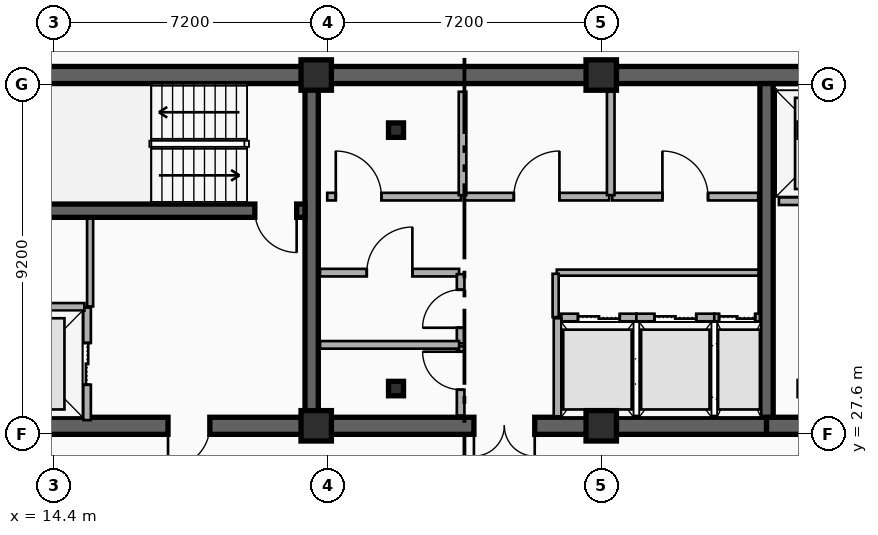
"""IFC4 building model, lengths in metres.
Left out: names, types, materials, properties, quantities, classifications, styles, units other than length and angle.
Written with IfcOpenShell. Run it as: python <this file> out.ifc"""

import sys

from ifc_helpers import new_model, si_unit, direction, frame, frame_2d, origin, origin_2d, place, context, subcontext, project, spatial, rectangle, i_section, extrude, element, fill, save


model = new_model("IFC4")
c1 = context("Model", 3, precision=1e-05, world=origin(), true_north=direction((0.0, 1.0)))
c2 = subcontext(c1, "Body", "Model", "MODEL_VIEW")
j1 = project(units=[si_unit("LENGTHUNIT", "METRE"), si_unit("PLANEANGLEUNIT", "RADIAN")], contexts=[c1])
p1 = place(None, origin())
s1 = spatial("IfcSite", under=j1, at=p1, CompositionType="ELEMENT")
p2 = place(p1, origin())
s2 = spatial("IfcBuilding", under=s1, at=p2, CompositionType="ELEMENT")
p3 = place(p2, frame((0.0, 0.0, 254.7)))
s3 = spatial("IfcBuildingStorey", under=s2, at=p3, CompositionType="ELEMENT", Elevation=254.7)
p4 = place(p3, frame((12.15, 37.05, 0.0), z_axis=(0.0, 0.0, 1.0), x_axis=(1.0, 0.0, 0.0)))
e1 = element("IfcWall", 1, at=p4, inside=s3, PredefinedType="SHEAR", context=c2, shape_type="SweptSolid", body=[
    extrude(rectangle(XDim=33.23, YDim=0.45, at=frame_2d((16.615, 0.0))), origin(), (0.0, 0.0, 1.0), 3.7),
])
p5 = place(p3, frame((21.18, 27.82, 0.0), z_axis=(0.0, 0.0, 1.0), x_axis=(-1.0, 0.0, 0.0)))
e2 = element("IfcWall", 2, at=p5, inside=s3, PredefinedType="SHEAR", context=c2, shape_type="SweptSolid", body=[
    extrude(rectangle(XDim=9.03, YDim=0.45, at=frame_2d((4.515, 0.0))), origin(), (0.0, 0.0, 1.0), 3.7),
])
p6 = place(p5, frame((2.68, 0.0, 0.0)))
e3 = element("IfcOpeningElement", 3, at=p6, cuts=e2, PredefinedType="OPENING", context=c2, shape_type="SweptSolid", body=[
    extrude(rectangle(XDim=1.1, YDim=2.15, at=frame_2d((0.55, 1.075))), frame((0.0, 0.235, 0.0), z_axis=(0.0, -1.0, 0.0), x_axis=(1.0, 0.0, 0.0)), (0.0, 0.0, 1.0), 0.47),
])
p7 = place(p3, frame((33.15, 27.82, 0.0), z_axis=(0.0, 0.0, 1.0), x_axis=(-1.0, 0.0, 0.0)))
e4 = element("IfcWall", 4, at=p7, inside=s3, PredefinedType="SHEAR", context=c2, shape_type="SweptSolid", body=[
    extrude(rectangle(XDim=11.97, YDim=0.45, at=frame_2d((5.985, 0.0))), origin(), (0.0, 0.0, 1.0), 3.7),
])
p8 = place(p7, frame((6.1, 0.0, 0.0)))
e5 = element("IfcOpeningElement", 5, at=p8, cuts=e4, PredefinedType="OPENING", context=c2, shape_type="SweptSolid", body=[
    extrude(rectangle(XDim=1.6, YDim=2.2, at=frame_2d((0.8, 1.1))), frame((0.0, 0.235, 0.0), z_axis=(0.0, -1.0, 0.0), x_axis=(1.0, 0.0, 0.0)), (0.0, 0.0, 1.0), 0.47),
])
p9 = place(p3, frame((45.38, 27.82, 0.0), z_axis=(0.0, 0.0, 1.0), x_axis=(-1.0, 0.0, 0.0)))
e6 = element("IfcWall", 6, at=p9, inside=s3, PredefinedType="SHEAR", context=c2, shape_type="SweptSolid", body=[
    extrude(rectangle(XDim=12.23, YDim=0.45, at=frame_2d((6.115, 0.0))), origin(), (0.0, 0.0, 1.0), 3.7),
])
p10 = place(p9, frame((9.93, 0.0, 0.0)))
e7 = element("IfcOpeningElement", 7, at=p10, cuts=e6, PredefinedType="OPENING", context=c2, shape_type="SweptSolid", body=[
    extrude(rectangle(XDim=1.1, YDim=2.15, at=frame_2d((0.55, 1.075))), frame((0.0, 0.235, 0.0), z_axis=(0.0, -1.0, 0.0), x_axis=(1.0, 0.0, 0.0)), (0.0, 0.0, 1.0), 0.47),
])
p11 = place(p9, frame((6.23, 0.0, 0.0)))
e8 = element("IfcOpeningElement", 8, at=p11, cuts=e6, PredefinedType="OPENING", context=c2, shape_type="SweptSolid", body=[
    extrude(rectangle(XDim=1.1, YDim=2.15, at=frame_2d((0.55, 1.075))), frame((0.0, 0.235, 0.0), z_axis=(0.0, -1.0, 0.0), x_axis=(1.0, 0.0, 0.0)), (0.0, 0.0, 1.0), 0.47),
])
for number, where, z_axis, x_axis in (
    (9, (21.18, 28.045, 0.0), (0.0, 0.0, 1.0), (0.0, 1.0, 0.0)),
    (10, (33.15, 28.045, 0.0), (0.0, 0.0, 1.0), (0.0, 1.0, 0.0)),
):
    element("IfcWall", number, at=place(p3, frame(where, z_axis=z_axis, x_axis=x_axis)), inside=s3, PredefinedType="SHEAR", context=c2, shape_type="SweptSolid", body=[
        extrude(rectangle(XDim=8.78, YDim=0.35, at=frame_2d((4.39, 0.0))), origin(), (0.0, 0.0, 1.0), 3.7),
    ])
p12 = place(p3, frame((21.005, 33.48, 0.0), z_axis=(0.0, 0.0, 1.0), x_axis=(-1.0, 0.0, 0.0)))
e11 = element("IfcWall", 11, at=p12, inside=s3, PredefinedType="SHEAR", context=c2, shape_type="SweptSolid", body=[
    extrude(rectangle(XDim=8.63, YDim=0.35, at=frame_2d((4.315, 0.0))), origin(), (0.0, 0.0, 1.0), 3.7),
])
p13 = place(p12, frame((0.22, 0.0, 0.0)))
e12 = element("IfcOpeningElement", 12, at=p13, cuts=e11, PredefinedType="OPENING", context=c2, shape_type="SweptSolid", body=[
    extrude(rectangle(XDim=1.1, YDim=2.15, at=frame_2d((0.55, 1.075))), frame((0.0, 0.185, 0.0), z_axis=(0.0, -1.0, 0.0), x_axis=(1.0, 0.0, 0.0)), (0.0, 0.0, 1.0), 0.37),
])
for number, where, z_axis, x_axis in (
    (13, (23.4, 28.8, 0.0), (0.0, 0.0, 1.0), (1.0, 0.0, 0.0)),
    (14, (23.4, 35.6, 0.0), (0.0, 0.0, 1.0), (1.0, 0.0, 0.0)),
):
    element("IfcColumn", number, at=place(p3, frame(where, z_axis=z_axis, x_axis=x_axis)), inside=s3, PredefinedType="COLUMN", context=c2, shape_type="SweptSolid", body=[
        extrude(i_section(OverallWidth=0.395, OverallDepth=0.38, WebThickness=0.019, FlangeThickness=0.03, FilletRadius=0.015, at=origin_2d()), origin(), (0.0, 0.0, 1.0), 3.7),
    ])
for number, where, z_axis, x_axis in (
    (15, (21.3, 27.82, 0.0), (0.0, 0.0, 1.0), (1.0, 0.0, 0.0)),
    (16, (21.3, 37.05, 0.0), (0.0, 0.0, 1.0), (1.0, 0.0, 0.0)),
    (17, (28.8, 27.82, 0.0), (0.0, 0.0, 1.0), (1.0, 0.0, 0.0)),
    (18, (28.8, 37.05, 0.0), (0.0, 0.0, 1.0), (1.0, 0.0, 0.0)),
):
    element("IfcColumn", number, at=place(p3, frame(where, z_axis=z_axis, x_axis=x_axis)), inside=s3, PredefinedType="COLUMN", context=c2, shape_type="SweptSolid", body=[
        extrude(rectangle(XDim=0.8, YDim=0.8, at=origin_2d()), origin(), (0.0, 0.0, 1.0), 3.7),
    ])
p14 = place(p3, frame((15.27, 27.97, 0.0), z_axis=(0.0, 0.0, 1.0), x_axis=(0.0, 1.0, 0.0)))
e19 = element("IfcWall", 19, at=p14, inside=s3, PredefinedType="PARTITIONING", context=c2, shape_type="SweptSolid", body=[
    extrude(rectangle(XDim=2.96, YDim=0.2, at=frame_2d((1.48, 0.0))), origin(), (0.0, 0.0, 1.0), 2.49),
])
p15 = place(p14, frame((0.93, 0.0, 0.0)))
e20 = element("IfcOpeningElement", 20, at=p15, cuts=e19, PredefinedType="OPENING", context=c2, shape_type="SweptSolid", body=[
    extrude(rectangle(XDim=1.1, YDim=2.15, at=frame_2d((0.55, 1.075))), frame((0.0, 0.11, 0.0), z_axis=(0.0, -1.0, 0.0), x_axis=(1.0, 0.0, 0.0)), (0.0, 0.0, 1.0), 0.22),
])
p16 = place(p3, frame((12.45, 30.95, 0.0), z_axis=(0.0, 0.0, 1.0), x_axis=(1.0, 0.0, 0.0)))
e21 = element("IfcWall", 21, at=p16, inside=s3, PredefinedType="PARTITIONING", context=c2, shape_type="SweptSolid", body=[
    extrude(rectangle(XDim=2.75, YDim=0.2, at=frame_2d((1.375, 0.0))), origin(), (0.0, 0.0, 1.0), 2.49),
])
p17 = place(p3, frame((33.475, 33.73, 0.0), z_axis=(0.0, 0.0, 1.0), x_axis=(1.0, 0.0, 0.0)))
e22 = element("IfcWall", 22, at=p17, inside=s3, PredefinedType="PARTITIONING", context=c2, shape_type="SweptSolid", body=[
    extrude(rectangle(XDim=2.725, YDim=0.2, at=frame_2d((1.362, 0.0))), origin(), (0.0, 0.0, 1.0), 2.49),
])
p18 = place(p17, frame((0.812, 0.0, 0.0)))
e23 = element("IfcOpeningElement", 23, at=p18, cuts=e22, PredefinedType="OPENING", context=c2, shape_type="SweptSolid", body=[
    extrude(rectangle(XDim=1.1, YDim=2.15, at=frame_2d((0.55, 1.075))), frame((0.0, 0.11, 0.0), z_axis=(0.0, -1.0, 0.0), x_axis=(1.0, 0.0, 0.0)), (0.0, 0.0, 1.0), 0.22),
])
p19 = place(p3, frame((27.75, 30.67, 0.0), z_axis=(0.0, 0.0, 1.0), x_axis=(1.0, 0.0, 0.0)))
e24 = element("IfcWall", 24, at=p19, inside=s3, PredefinedType="PARTITIONING", context=c2, shape_type="SweptSolid", body=[
    extrude(rectangle(XDim=1.975, YDim=0.2, at=frame_2d((0.988, 0.0))), origin(), (0.0, 0.0, 1.0), 2.49),
])
p20 = place(p19, frame((0.438, 0.0, 0.0)))
e25 = element("IfcOpeningElement", 25, at=p20, cuts=e24, PredefinedType="OPENING", context=c2, shape_type="SweptSolid", body=[
    extrude(rectangle(XDim=1.1, YDim=2.15, at=frame_2d((0.55, 1.075))), frame((0.0, 0.11, 0.0), z_axis=(0.0, -1.0, 0.0), x_axis=(1.0, 0.0, 0.0)), (0.0, 0.0, 1.0), 0.22),
])
p21 = place(p3, frame((27.65, 28.07, 0.0), z_axis=(0.0, 0.0, 1.0), x_axis=(0.0, 1.0, 0.0)))
e26 = element("IfcWall", 26, at=p21, inside=s3, PredefinedType="PARTITIONING", context=c2, shape_type="SweptSolid", body=[
    extrude(rectangle(XDim=2.58, YDim=0.2, at=frame_2d((1.29, 0.0))), origin(), (0.0, 0.0, 1.0), 2.49),
])
p22 = place(p3, frame((29.725, 30.67, 0.0), z_axis=(0.0, 0.0, 1.0), x_axis=(1.0, 0.0, 0.0)))
e27 = element("IfcWall", 27, at=p22, inside=s3, PredefinedType="PARTITIONING", context=c2, shape_type="SweptSolid", body=[
    extrude(rectangle(XDim=2.05, YDim=0.2, at=frame_2d((1.025, 0.0))), origin(), (0.0, 0.0, 1.0), 2.8),
])
p23 = place(p22, frame((0.475, 0.0, 0.0)))
e28 = element("IfcOpeningElement", 28, at=p23, cuts=e27, PredefinedType="OPENING", context=c2, shape_type="SweptSolid", body=[
    extrude(rectangle(XDim=1.1, YDim=2.15, at=frame_2d((0.55, 1.075))), frame((0.0, 0.11, 0.0), z_axis=(0.0, -1.0, 0.0), x_axis=(1.0, 0.0, 0.0)), (0.0, 0.0, 1.0), 0.22),
])
p24 = place(p3, frame((31.775, 30.67, 0.0), z_axis=(0.0, 0.0, 1.0), x_axis=(1.0, 0.0, 0.0)))
e29 = element("IfcWall", 29, at=p24, inside=s3, PredefinedType="PARTITIONING", context=c2, shape_type="SweptSolid", body=[
    extrude(rectangle(XDim=1.2, YDim=0.2, at=frame_2d((0.6, 0.0))), origin(), (0.0, 0.0, 1.0), 2.8),
])
p25 = place(p24, frame((0.125, 0.0, 0.0)))
e30 = element("IfcOpeningElement", 30, at=p25, cuts=e29, PredefinedType="OPENING", context=c2, shape_type="SweptSolid", body=[
    extrude(rectangle(XDim=0.95, YDim=2.15, at=frame_2d((0.475, 1.075))), frame((0.0, 0.11, 0.0), z_axis=(0.0, -1.0, 0.0), x_axis=(1.0, 0.0, 0.0)), (0.0, 0.0, 1.0), 0.22),
])
p26 = place(p3, frame((21.4, 31.85, 0.0), z_axis=(0.0, 0.0, 1.0), x_axis=(1.0, 0.0, 0.0)))
e31 = element("IfcWall", 31, at=p26, inside=s3, PredefinedType="PARTITIONING", context=c2, shape_type="SweptSolid", body=[
    extrude(rectangle(XDim=3.66, YDim=0.2, at=frame_2d((1.83, 0.0))), origin(), (0.0, 0.0, 1.0), 2.49),
])
p27 = place(p26, frame((1.23, 0.0, 0.0)))
e32 = element("IfcOpeningElement", 32, at=p27, cuts=e31, PredefinedType="OPENING", context=c2, shape_type="SweptSolid", body=[
    extrude(rectangle(XDim=1.2, YDim=2.15, at=frame_2d((0.6, 1.075))), frame((0.0, 0.11, 0.0), z_axis=(0.0, -1.0, 0.0), x_axis=(1.0, 0.0, 0.0)), (0.0, 0.0, 1.0), 0.22),
])
p28 = place(p3, frame((21.59, 33.85, 0.0), z_axis=(0.0, 0.0, 1.0), x_axis=(1.0, 0.0, 0.0)))
e33 = element("IfcWall", 33, at=p28, inside=s3, PredefinedType="PARTITIONING", context=c2, shape_type="SweptSolid", body=[
    extrude(rectangle(XDim=3.52, YDim=0.2, at=frame_2d((1.76, 0.0))), origin(), (0.0, 0.0, 1.0), 2.49),
])
p29 = place(p28, frame((0.225, 0.0, 0.0)))
e34 = element("IfcOpeningElement", 34, at=p29, cuts=e33, PredefinedType="OPENING", context=c2, shape_type="SweptSolid", body=[
    extrude(rectangle(XDim=1.2, YDim=2.15, at=frame_2d((0.6, 1.075))), frame((0.0, 0.11, 0.0), z_axis=(0.0, -1.0, 0.0), x_axis=(1.0, 0.0, 0.0)), (0.0, 0.0, 1.0), 0.22),
])
p30 = place(p3, frame((25.19, 33.85, 0.0), z_axis=(0.0, 0.0, 1.0), x_axis=(1.0, 0.0, 0.0)))
e35 = element("IfcWall", 35, at=p30, inside=s3, PredefinedType="PARTITIONING", context=c2, shape_type="SweptSolid", body=[
    extrude(rectangle(XDim=3.82, YDim=0.2, at=frame_2d((1.91, 0.0))), origin(), (0.0, 0.0, 1.0), 2.49),
])
p31 = place(p30, frame((1.31, 0.0, 0.0)))
e36 = element("IfcOpeningElement", 36, at=p31, cuts=e35, PredefinedType="OPENING", context=c2, shape_type="SweptSolid", body=[
    extrude(rectangle(XDim=1.2, YDim=2.15, at=frame_2d((0.6, 1.075))), frame((0.0, 0.11, 0.0), z_axis=(0.0, -1.0, 0.0), x_axis=(1.0, 0.0, 0.0)), (0.0, 0.0, 1.0), 0.22),
])
p32 = place(p3, frame((29.09, 33.85, 0.0), z_axis=(0.0, 0.0, 1.0), x_axis=(1.0, 0.0, 0.0)))
e37 = element("IfcWall", 37, at=p32, inside=s3, PredefinedType="PARTITIONING", context=c2, shape_type="SweptSolid", body=[
    extrude(rectangle(XDim=3.84, YDim=0.2, at=frame_2d((1.92, 0.0))), origin(), (0.0, 0.0, 1.0), 2.49),
])
p33 = place(p32, frame((1.32, 0.0, 0.0)))
e38 = element("IfcOpeningElement", 38, at=p33, cuts=e37, PredefinedType="OPENING", context=c2, shape_type="SweptSolid", body=[
    extrude(rectangle(XDim=1.2, YDim=2.15, at=frame_2d((0.6, 1.075))), frame((0.0, 0.11, 0.0), z_axis=(0.0, -1.0, 0.0), x_axis=(1.0, 0.0, 0.0)), (0.0, 0.0, 1.0), 0.22),
])
p34 = place(p3, frame((25.1, 28.09, 0.0), z_axis=(0.0, 0.0, 1.0), x_axis=(0.0, 1.0, 0.0)))
e39 = element("IfcWall", 39, at=p34, inside=s3, PredefinedType="PARTITIONING", context=c2, shape_type="SweptSolid", body=[
    extrude(rectangle(XDim=1.82, YDim=0.2, at=frame_2d((0.91, 0.0))), origin(), (0.0, 0.0, 1.0), 2.8),
])
p35 = place(p34, frame((0.68, 0.0, 0.0)))
e40 = element("IfcOpeningElement", 40, at=p35, cuts=e39, PredefinedType="OPENING", context=c2, shape_type="SweptSolid", body=[
    extrude(rectangle(XDim=1.0, YDim=2.15, at=frame_2d((0.5, 1.075))), frame((0.0, 0.11, 0.0), z_axis=(0.0, -1.0, 0.0), x_axis=(1.0, 0.0, 0.0)), (0.0, 0.0, 1.0), 0.22),
])
p36 = place(p3, frame((25.1, 29.99, 0.0), z_axis=(0.0, 0.0, 1.0), x_axis=(0.0, 1.0, 0.0)))
e41 = element("IfcWall", 41, at=p36, inside=s3, PredefinedType="PARTITIONING", context=c2, shape_type="SweptSolid", body=[
    extrude(rectangle(XDim=1.82, YDim=0.2, at=frame_2d((0.91, 0.0))), origin(), (0.0, 0.0, 1.0), 3.42),
])
p37 = place(p36, frame((0.41, 0.0, 0.0)))
e42 = element("IfcOpeningElement", 42, at=p37, cuts=e41, PredefinedType="OPENING", context=c2, shape_type="SweptSolid", body=[
    extrude(rectangle(XDim=1.0, YDim=2.15, at=frame_2d((0.5, 1.075))), frame((0.0, 0.11, 0.0), z_axis=(0.0, -1.0, 0.0), x_axis=(1.0, 0.0, 0.0)), (0.0, 0.0, 1.0), 0.22),
])
p38 = place(p3, frame((21.4, 29.95, 0.0), z_axis=(0.0, 0.0, 1.0), x_axis=(1.0, 0.0, 0.0)))
e43 = element("IfcWall", 43, at=p38, inside=s3, PredefinedType="PARTITIONING", context=c2, shape_type="SweptSolid", body=[
    extrude(rectangle(XDim=3.66, YDim=0.2, at=frame_2d((1.83, 0.0))), origin(), (0.0, 0.0, 1.0), 2.49),
])
p39 = place(p3, frame((25.15, 33.89, 0.0), z_axis=(0.0, 0.0, 1.0), x_axis=(0.0, 1.0, 0.0)))
e44 = element("IfcWall", 44, at=p39, inside=s3, PredefinedType="PARTITIONING", context=c2, shape_type="SweptSolid", body=[
    extrude(rectangle(XDim=2.72, YDim=0.2, at=frame_2d((1.36, 0.0))), origin(), (0.0, 0.0, 1.0), 3.42),
])
p40 = place(p3, frame((29.05, 33.89, 0.0), z_axis=(0.0, 0.0, 1.0), x_axis=(0.0, 1.0, 0.0)))
e45 = element("IfcWall", 45, at=p40, inside=s3, PredefinedType="PARTITIONING", context=c2, shape_type="SweptSolid", body=[
    extrude(rectangle(XDim=2.72, YDim=0.2, at=frame_2d((1.36, 0.0))), origin(), (0.0, 0.0, 1.0), 2.49),
])
p41 = place(p3, frame((15.35, 30.96, 0.0), z_axis=(0.0, 0.0, 1.0), x_axis=(0.0, 1.0, 0.0)))
e46 = element("IfcWall", 46, at=p41, inside=s3, PredefinedType="PARTITIONING", context=c2, shape_type="SweptSolid", body=[
    extrude(rectangle(XDim=2.31, YDim=0.16, at=frame_2d((1.155, 0.0))), origin(), (0.0, 0.0, 1.0), 3.42),
])
p42 = place(p3, frame((27.63, 31.85, 0.0), z_axis=(0.0, 0.0, 1.0), x_axis=(1.0, 0.0, 0.0)))
e47 = element("IfcWall", 47, at=p42, inside=s3, PredefinedType="PARTITIONING", context=c2, shape_type="SweptSolid", body=[
    extrude(rectangle(XDim=5.31, YDim=0.16, at=frame_2d((2.655, 0.0))), origin(), (0.0, 0.0, 1.0), 2.49),
])
p43 = place(p3, frame((27.6, 30.68, 0.0), z_axis=(0.0, 0.0, 1.0), x_axis=(0.0, 1.0, 0.0)))
e48 = element("IfcWall", 48, at=p43, inside=s3, PredefinedType="PARTITIONING", context=c2, shape_type="SweptSolid", body=[
    extrude(rectangle(XDim=1.14, YDim=0.16, at=frame_2d((0.57, 0.0))), origin(), (0.0, 0.0, 1.0), 3.42),
])
p44 = place(p15, origin())
e49 = element("IfcDoor", 49, at=p44, inside=s3, OperationType="DOUBLE_DOOR_SLIDING", PredefinedType="DOOR", context=c2, shape_type="SweptSolid", body=[
    extrude(rectangle(XDim=1.1, YDim=2.15, at=frame_2d((0.55, 1.075))), frame((0.0, 0.025, 0.0), z_axis=(0.0, -1.0, 0.0), x_axis=(1.0, 0.0, 0.0)), (0.0, 0.0, 1.0), 0.05),
])
fill(e20, e49)
p45 = place(p20, origin())
e50 = element("IfcDoor", 50, at=p45, inside=s3, OperationType="DOUBLE_DOOR_SLIDING", PredefinedType="DOOR", context=c2, shape_type="SweptSolid", body=[
    extrude(rectangle(XDim=1.1, YDim=2.15, at=frame_2d((0.55, 1.075))), frame((0.0, 0.025, 0.0), z_axis=(0.0, -1.0, 0.0), x_axis=(1.0, 0.0, 0.0)), (0.0, 0.0, 1.0), 0.05),
])
fill(e25, e50)
p46 = place(p23, origin())
e51 = element("IfcDoor", 51, at=p46, inside=s3, OperationType="DOUBLE_DOOR_SLIDING", PredefinedType="DOOR", context=c2, shape_type="SweptSolid", body=[
    extrude(rectangle(XDim=1.1, YDim=2.15, at=frame_2d((0.55, 1.075))), frame((0.0, 0.025, 0.0), z_axis=(0.0, -1.0, 0.0), x_axis=(1.0, 0.0, 0.0)), (0.0, 0.0, 1.0), 0.05),
])
fill(e28, e51)
p47 = place(p25, origin())
e52 = element("IfcDoor", 52, at=p47, inside=s3, OperationType="DOUBLE_DOOR_SLIDING", PredefinedType="DOOR", context=c2, shape_type="SweptSolid", body=[
    extrude(rectangle(XDim=0.95, YDim=2.15, at=frame_2d((0.475, 1.075))), frame((0.0, 0.025, 0.0), z_axis=(0.0, -1.0, 0.0), x_axis=(1.0, 0.0, 0.0)), (0.0, 0.0, 1.0), 0.05),
])
fill(e30, e52)
p48 = place(p13, origin())
e53 = element("IfcDoor", 53, at=p48, inside=s3, OperationType="SINGLE_SWING_LEFT", PredefinedType="DOOR", context=c2, shape_type="SweptSolid", body=[
    extrude(rectangle(XDim=1.1, YDim=2.15, at=frame_2d((0.55, 1.075))), frame((0.0, 0.025, 0.0), z_axis=(0.0, -1.0, 0.0), x_axis=(1.0, 0.0, 0.0)), (0.0, 0.0, 1.0), 0.05),
])
fill(e12, e53)
p49 = place(p6, origin())
e54 = element("IfcDoor", 54, at=p49, inside=s3, OperationType="SINGLE_SWING_RIGHT", PredefinedType="DOOR", context=c2, shape_type="SweptSolid", body=[
    extrude(rectangle(XDim=1.1, YDim=2.15, at=frame_2d((0.55, 1.075))), frame((0.0, 0.025, 0.0), z_axis=(0.0, -1.0, 0.0), x_axis=(1.0, 0.0, 0.0)), (0.0, 0.0, 1.0), 0.05),
])
fill(e3, e54)
p50 = place(p8, origin())
e55 = element("IfcDoor", 55, at=p50, inside=s3, OperationType="SINGLE_SWING_LEFT", PredefinedType="DOOR", context=c2, shape_type="SweptSolid", body=[
    extrude(rectangle(XDim=1.6, YDim=2.2, at=frame_2d((0.8, 1.1))), frame((0.0, 0.025, 0.0), z_axis=(0.0, -1.0, 0.0), x_axis=(1.0, 0.0, 0.0)), (0.0, 0.0, 1.0), 0.05),
])
fill(e5, e55)
p51 = place(p27, origin())
e56 = element("IfcDoor", 56, at=p51, inside=s3, OperationType="SINGLE_SWING_RIGHT", PredefinedType="DOOR", context=c2, shape_type="SweptSolid", body=[
    extrude(rectangle(XDim=1.2, YDim=2.15, at=frame_2d((0.6, 1.075))), frame((0.0, 0.025, 0.0), z_axis=(0.0, -1.0, 0.0), x_axis=(1.0, 0.0, 0.0)), (0.0, 0.0, 1.0), 0.05),
])
fill(e32, e56)
p52 = place(p29, origin())
e57 = element("IfcDoor", 57, at=p52, inside=s3, OperationType="SINGLE_SWING_LEFT", PredefinedType="DOOR", context=c2, shape_type="SweptSolid", body=[
    extrude(rectangle(XDim=1.2, YDim=2.15, at=frame_2d((0.6, 1.075))), frame((0.0, 0.025, 0.0), z_axis=(0.0, -1.0, 0.0), x_axis=(1.0, 0.0, 0.0)), (0.0, 0.0, 1.0), 0.05),
])
fill(e34, e57)
p53 = place(p31, origin())
e58 = element("IfcDoor", 58, at=p53, inside=s3, OperationType="SINGLE_SWING_RIGHT", PredefinedType="DOOR", context=c2, shape_type="SweptSolid", body=[
    extrude(rectangle(XDim=1.2, YDim=2.15, at=frame_2d((0.6, 1.075))), frame((0.0, 0.025, 0.0), z_axis=(0.0, -1.0, 0.0), x_axis=(1.0, 0.0, 0.0)), (0.0, 0.0, 1.0), 0.05),
])
fill(e36, e58)
p54 = place(p33, origin())
e59 = element("IfcDoor", 59, at=p54, inside=s3, OperationType="SINGLE_SWING_LEFT", PredefinedType="DOOR", context=c2, shape_type="SweptSolid", body=[
    extrude(rectangle(XDim=1.2, YDim=2.15, at=frame_2d((0.6, 1.075))), frame((0.0, 0.025, 0.0), z_axis=(0.0, -1.0, 0.0), x_axis=(1.0, 0.0, 0.0)), (0.0, 0.0, 1.0), 0.05),
])
fill(e38, e59)
p55 = place(p35, origin())
e60 = element("IfcDoor", 60, at=p55, inside=s3, OperationType="SINGLE_SWING_RIGHT", PredefinedType="DOOR", context=c2, shape_type="SweptSolid", body=[
    extrude(rectangle(XDim=1.0, YDim=2.15, at=frame_2d((0.5, 1.075))), frame((0.0, 0.025, 0.0), z_axis=(0.0, -1.0, 0.0), x_axis=(1.0, 0.0, 0.0)), (0.0, 0.0, 1.0), 0.05),
])
fill(e40, e60)
p56 = place(p37, origin())
e61 = element("IfcDoor", 61, at=p56, inside=s3, OperationType="SINGLE_SWING_LEFT", PredefinedType="DOOR", context=c2, shape_type="SweptSolid", body=[
    extrude(rectangle(XDim=1.0, YDim=2.15, at=frame_2d((0.5, 1.075))), frame((0.0, 0.025, 0.0), z_axis=(0.0, -1.0, 0.0), x_axis=(1.0, 0.0, 0.0)), (0.0, 0.0, 1.0), 0.05),
])
fill(e42, e61)
save(model, sys.argv[1])
